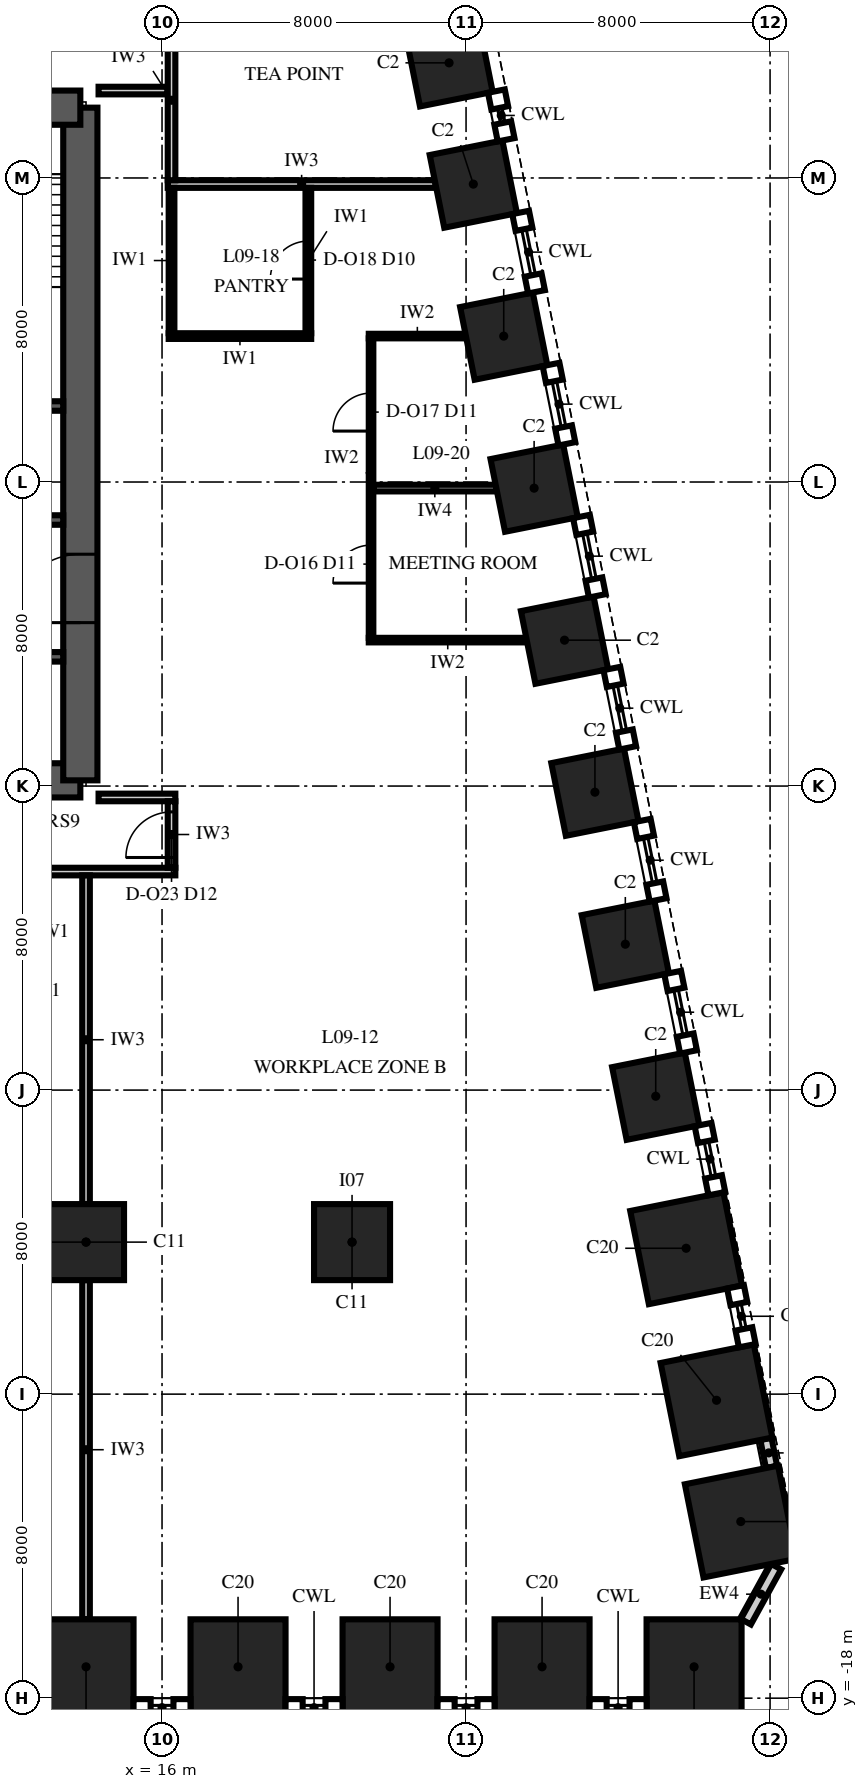
"""IFC4 building model, lengths in metres.
Left out: names, types, materials, properties, quantities, classifications, styles, units other than length and angle.
Written with IfcOpenShell. Run it as: python <this file> out.ifc"""

import sys

from ifc_helpers import new_model, si_unit, direction, frame, frame_2d, origin, origin_2d, place, context, subcontext, project, spatial, polyline, rectangle, outline, extrude, element, fill, save


model = new_model("IFC4")
c1 = context("Model", 3, precision=1e-05, world=origin(), true_north=direction((0.0, 1.0)))
c2 = subcontext(c1, "Body", "Model", "MODEL_VIEW")
j1 = project(units=[si_unit("LENGTHUNIT", "METRE"), si_unit("PLANEANGLEUNIT", "RADIAN")], contexts=[c1])
p1 = place(None, origin())
s1 = spatial("IfcSite", under=j1, at=p1, CompositionType="ELEMENT")
p2 = place(p1, origin())
s2 = spatial("IfcBuilding", under=s1, at=p2, CompositionType="ELEMENT")
p3 = place(p2, frame((0.0, 0.0, 48.0)))
s3 = spatial("IfcBuildingStorey", under=s2, at=p3, CompositionType="ELEMENT", Elevation=48.0)
for number, where, z_axis, x_axis in (
    (1, (14.0, -17.175, 0.0), (0.0, 0.0, 1.0), (1.0, 0.0, 0.0)),
    (2, (18.0, -17.175, 0.0), (0.0, 0.0, 1.0), (1.0, 0.0, 0.0)),
    (3, (22.0, -17.175, 0.0), (0.0, 0.0, 1.0), (1.0, 0.0, 0.0)),
    (4, (26.0, -17.175, 0.0), (0.0, 0.0, 1.0), (1.0, 0.0, 0.0)),
    (5, (30.0, -17.175, 0.0), (0.0, 0.0, 1.0), (1.0, 0.0, 0.0)),
    (6, (31.229, -13.353, 0.0), (0.0, 0.0, 1.0), (-0.196, 0.981, 0.0)),
    (7, (30.591, -10.162, 0.0), (0.0, 0.0, 1.0), (-0.196, 0.981, 0.0)),
    (8, (29.791, -6.162, 0.0), (0.0, 0.0, 1.0), (-0.196, 0.981, 0.0)),
):
    element("IfcColumn", number, at=place(p3, frame(where, z_axis=z_axis, x_axis=x_axis)), inside=s3, PredefinedType="COLUMN", context=c2, shape_type="SweptSolid", body=[
        extrude(rectangle(XDim=2.5, YDim=2.5, at=origin_2d()), origin(), (0.0, 0.0, 1.0), 4.0),
    ])
for number, where, z_axis, x_axis in (
    (9, (28.991, -2.162, 0.0), (0.0, 0.0, 1.0), (-0.196, 0.981, 0.0)),
    (10, (28.191, 1.838, 0.0), (0.0, 0.0, 1.0), (-0.196, 0.981, 0.0)),
    (11, (27.391, 5.838, 0.0), (0.0, 0.0, 1.0), (-0.196, 0.981, 0.0)),
    (12, (26.591, 9.838, 0.0), (0.0, 0.0, 1.0), (-0.196, 0.981, 0.0)),
    (13, (25.791, 13.838, 0.0), (0.0, 0.0, 1.0), (-0.196, 0.981, 0.0)),
    (14, (24.991, 17.838, 0.0), (0.0, 0.0, 1.0), (-0.196, 0.981, 0.0)),
    (15, (24.191, 21.838, 0.0), (0.0, 0.0, 1.0), (-0.196, 0.981, 0.0)),
    (16, (23.553, 25.029, 0.0), (0.0, 0.0, 1.0), (-0.196, 0.981, 0.0)),
):
    element("IfcColumn", number, at=place(p3, frame(where, z_axis=z_axis, x_axis=x_axis)), inside=s3, PredefinedType="COLUMN", context=c2, shape_type="SweptSolid", body=[
        extrude(rectangle(XDim=1.95, YDim=1.95, at=origin_2d()), origin(), (0.0, 0.0, 1.0), 4.0),
    ])
for number, where, z_axis, x_axis in (
    (17, (14.0, -6.0, 0.0), (0.0, 0.0, 1.0), (1.0, 0.0, 0.0)),
    (18, (21.0, -6.0, 0.0), (0.0, 0.0, 1.0), (1.0, 0.0, 0.0)),
):
    element("IfcColumn", number, at=place(p3, frame(where, z_axis=z_axis, x_axis=x_axis)), inside=s3, PredefinedType="COLUMN", context=c2, shape_type="SweptSolid", body=[
        extrude(rectangle(XDim=2.0, YDim=2.0, at=origin_2d()), origin(), (0.0, 0.0, 1.0), 4.0),
    ])
p4 = place(p3, frame((-13.85, 6.15, 0.0), z_axis=(0.0, 0.0, 1.0), x_axis=(1.0, 0.0, 0.0)))
e19 = element("IfcWall", 19, at=p4, inside=s3, PredefinedType="SHEAR", context=c2, shape_type="SweptSolid", body=[
    extrude(rectangle(XDim=27.7, YDim=0.9, at=frame_2d((13.85, 0.0))), origin(), (0.0, 0.0, 1.0), 4.0),
])
p5 = place(p3, frame((13.85, 6.15, 0.0), z_axis=(0.0, 0.0, 1.0), x_axis=(0.0, 1.0, 0.0)))
e20 = element("IfcWall", 20, at=p5, inside=s3, PredefinedType="SHEAR", context=c2, shape_type="SweptSolid", body=[
    extrude(outline(polyline([(0.0, -0.45), (17.7, -0.45), (17.7, 0.0), (17.25, 0.0), (17.25, 0.45), (0.45, 0.45), (0.45, 0.0), (0.0, 0.0), (0.0, -0.45)])), origin(), (0.0, 0.0, 1.0), 4.0),
])
p6 = place(p5, frame((4.15, 0.0, 0.0)))
e21 = element("IfcOpeningElement", 21, at=p6, cuts=e20, PredefinedType="OPENING", context=c2, shape_type="SweptSolid", body=[
    extrude(rectangle(XDim=1.8, YDim=2.4, at=frame_2d((0.9, 1.2))), frame((0.0, 0.465, 0.0), z_axis=(0.0, -1.0, 0.0), x_axis=(1.0, 0.0, 0.0)), (0.0, 0.0, 1.0), 0.93),
])
p7 = place(p3, frame((13.85, 23.85, 0.0), z_axis=(0.0, 0.0, 1.0), x_axis=(-1.0, 0.0, 0.0)))
e22 = element("IfcWall", 22, at=p7, inside=s3, PredefinedType="SHEAR", context=c2, shape_type="SweptSolid", body=[
    extrude(rectangle(XDim=27.7, YDim=0.9, at=frame_2d((13.85, 0.0))), origin(), (0.0, 0.0, 1.0), 4.0),
])
p8 = place(p7, frame((21.75, 0.0, 0.0)))
e23 = element("IfcOpeningElement", 23, at=p8, cuts=e22, PredefinedType="OPENING", context=c2, shape_type="SweptSolid", body=[
    extrude(rectangle(XDim=1.0, YDim=2.1, at=frame_2d((0.5, 1.05))), frame((0.0, 0.465, 0.0), z_axis=(0.0, -1.0, 0.0), x_axis=(1.0, 0.0, 0.0)), (0.0, 0.0, 1.0), 0.93),
])
p9 = place(p7, frame((4.95, 0.0, 0.0)))
e24 = element("IfcOpeningElement", 24, at=p9, cuts=e22, PredefinedType="OPENING", context=c2, shape_type="SweptSolid", body=[
    extrude(rectangle(XDim=1.0, YDim=2.1, at=frame_2d((0.5, 1.05))), frame((0.0, 0.465, 0.0), z_axis=(0.0, -1.0, 0.0), x_axis=(1.0, 0.0, 0.0)), (0.0, 0.0, 1.0), 0.93),
])
p10 = place(p7, frame((17.35, 0.0, 0.0)))
e25 = element("IfcOpeningElement", 25, at=p10, cuts=e22, PredefinedType="OPENING", context=c2, shape_type="SweptSolid", body=[
    extrude(rectangle(XDim=1.0, YDim=2.1, at=frame_2d((0.5, 1.05))), frame((0.0, 0.465, 0.0), z_axis=(0.0, -1.0, 0.0), x_axis=(1.0, 0.0, 0.0)), (0.0, 0.0, 1.0), 0.93),
])
p11 = place(p7, frame((13.35, 0.0, 0.0)))
e26 = element("IfcOpeningElement", 26, at=p11, cuts=e22, PredefinedType="OPENING", context=c2, shape_type="SweptSolid", body=[
    extrude(rectangle(XDim=1.0, YDim=2.1, at=frame_2d((0.5, 1.05))), frame((0.0, 0.465, 0.0), z_axis=(0.0, -1.0, 0.0), x_axis=(1.0, 0.0, 0.0)), (0.0, 0.0, 1.0), 0.93),
])
p12 = place(p7, frame((9.35, 0.0, 0.0)))
e27 = element("IfcOpeningElement", 27, at=p12, cuts=e22, PredefinedType="OPENING", context=c2, shape_type="SweptSolid", body=[
    extrude(rectangle(XDim=1.0, YDim=2.1, at=frame_2d((0.5, 1.05))), frame((0.0, 0.465, 0.0), z_axis=(0.0, -1.0, 0.0), x_axis=(1.0, 0.0, 0.0)), (0.0, 0.0, 1.0), 0.93),
])
p13 = place(p3, frame((-13.4, 9.4, 0.0), z_axis=(0.0, 0.0, 1.0), x_axis=(1.0, 0.0, 0.0)))
e28 = element("IfcWall", 28, at=p13, inside=s3, PredefinedType="SHEAR", context=c2, shape_type="SweptSolid", body=[
    extrude(rectangle(XDim=26.8, YDim=0.25, at=frame_2d((13.4, 0.0))), origin(), (0.0, 0.0, 1.0), 4.0),
])
p14 = place(p13, frame((0.25, 0.0, 0.0)))
e29 = element("IfcOpeningElement", 29, at=p14, cuts=e28, PredefinedType="OPENING", context=c2, shape_type="SweptSolid", body=[
    extrude(rectangle(XDim=1.1, YDim=2.1, at=frame_2d((0.55, 1.05))), frame((0.0, 0.14, 0.0), z_axis=(0.0, -1.0, 0.0), x_axis=(1.0, 0.0, 0.0)), (0.0, 0.0, 1.0), 0.28),
])
p15 = place(p13, frame((3.05, 0.0, 0.0)))
e30 = element("IfcOpeningElement", 30, at=p15, cuts=e28, PredefinedType="OPENING", context=c2, shape_type="SweptSolid", body=[
    extrude(rectangle(XDim=1.1, YDim=2.1, at=frame_2d((0.55, 1.05))), frame((0.0, 0.14, 0.0), z_axis=(0.0, -1.0, 0.0), x_axis=(1.0, 0.0, 0.0)), (0.0, 0.0, 1.0), 0.28),
])
p16 = place(p13, frame((5.85, 0.0, 0.0)))
e31 = element("IfcOpeningElement", 31, at=p16, cuts=e28, PredefinedType="OPENING", context=c2, shape_type="SweptSolid", body=[
    extrude(rectangle(XDim=1.1, YDim=2.1, at=frame_2d((0.55, 1.05))), frame((0.0, 0.14, 0.0), z_axis=(0.0, -1.0, 0.0), x_axis=(1.0, 0.0, 0.0)), (0.0, 0.0, 1.0), 0.28),
])
p17 = place(p3, frame((-13.4, 13.0, 0.0), z_axis=(0.0, 0.0, 1.0), x_axis=(1.0, 0.0, 0.0)))
e32 = element("IfcWall", 32, at=p17, inside=s3, PredefinedType="SHEAR", context=c2, shape_type="SweptSolid", body=[
    extrude(rectangle(XDim=26.8, YDim=0.25, at=frame_2d((13.4, 0.0))), origin(), (0.0, 0.0, 1.0), 4.0),
])
p18 = place(p17, frame((0.25, 0.0, 0.0)))
e33 = element("IfcOpeningElement", 33, at=p18, cuts=e32, PredefinedType="OPENING", context=c2, shape_type="SweptSolid", body=[
    extrude(rectangle(XDim=1.1, YDim=2.1, at=frame_2d((0.55, 1.05))), frame((0.0, 0.14, 0.0), z_axis=(0.0, -1.0, 0.0), x_axis=(1.0, 0.0, 0.0)), (0.0, 0.0, 1.0), 0.28),
])
p19 = place(p17, frame((8.65, 0.0, 0.0)))
e34 = element("IfcOpeningElement", 34, at=p19, cuts=e32, PredefinedType="OPENING", context=c2, shape_type="SweptSolid", body=[
    extrude(rectangle(XDim=1.1, YDim=2.1, at=frame_2d((0.55, 1.05))), frame((0.0, 0.14, 0.0), z_axis=(0.0, -1.0, 0.0), x_axis=(1.0, 0.0, 0.0)), (0.0, 0.0, 1.0), 0.28),
])
p20 = place(p17, frame((12.05, 0.0, 0.0)))
e35 = element("IfcOpeningElement", 35, at=p20, cuts=e32, PredefinedType="OPENING", context=c2, shape_type="SweptSolid", body=[
    extrude(rectangle(XDim=1.1, YDim=2.1, at=frame_2d((0.55, 1.05))), frame((0.0, 0.14, 0.0), z_axis=(0.0, -1.0, 0.0), x_axis=(1.0, 0.0, 0.0)), (0.0, 0.0, 1.0), 0.28),
])
p21 = place(p17, frame((15.25, 0.0, 0.0)))
e36 = element("IfcOpeningElement", 36, at=p21, cuts=e32, PredefinedType="OPENING", context=c2, shape_type="SweptSolid", body=[
    extrude(rectangle(XDim=0.9, YDim=2.1, at=frame_2d((0.45, 1.05))), frame((0.0, 0.14, 0.0), z_axis=(0.0, -1.0, 0.0), x_axis=(1.0, 0.0, 0.0)), (0.0, 0.0, 1.0), 0.28),
])
p22 = place(p17, frame((17.65, 0.0, 0.0)))
e37 = element("IfcOpeningElement", 37, at=p22, cuts=e32, PredefinedType="OPENING", context=c2, shape_type="SweptSolid", body=[
    extrude(rectangle(XDim=0.9, YDim=2.1, at=frame_2d((0.45, 1.05))), frame((0.0, 0.14, 0.0), z_axis=(0.0, -1.0, 0.0), x_axis=(1.0, 0.0, 0.0)), (0.0, 0.0, 1.0), 0.28),
])
p23 = place(p3, frame((-13.4, 16.0, 0.0), z_axis=(0.0, 0.0, 1.0), x_axis=(1.0, 0.0, 0.0)))
e38 = element("IfcWall", 38, at=p23, inside=s3, PredefinedType="SHEAR", context=c2, shape_type="SweptSolid", body=[
    extrude(rectangle(XDim=26.8, YDim=0.25, at=frame_2d((13.4, 0.0))), origin(), (0.0, 0.0, 1.0), 4.0),
])
p24 = place(p3, frame((31.363, -15.988, 0.0), z_axis=(0.0, 0.0, 1.0), x_axis=(0.481879089964, 0.876237720402, 0.0)))
e39 = element("IfcWall", 39, at=p24, inside=s3, PredefinedType="SOLIDWALL", context=c2, shape_type="SweptSolid", body=[
    extrude(rectangle(XDim=1.654, YDim=0.3, at=frame_2d((0.827, 0.0))), origin(), (0.0, 0.0, 1.0), 4.0),
])
p25 = place(p3, frame((32.038, -11.916, 0.0), z_axis=(0.0, 0.0, 1.0), x_axis=(-0.195867092459, 0.980630451338, 0.0)))
e40 = element("IfcWall", 40, at=p25, inside=s3, PredefinedType="SOLIDWALL", context=c2, shape_type="SweptSolid", body=[
    extrude(rectangle(XDim=0.754, YDim=0.3, at=frame_2d((0.377, 0.0))), origin(), (0.0, 0.0, 1.0), 4.0),
])
p26 = place(p3, frame((-16.35, 3.75, 0.0), z_axis=(0.0, 0.0, 1.0), x_axis=(1.0, 0.0, 0.0)))
e41 = element("IfcWall", 41, at=p26, inside=s3, PredefinedType="PARTITIONING", context=c2, shape_type="SweptSolid", body=[
    extrude(rectangle(XDim=32.7, YDim=0.2, at=frame_2d((16.35, 0.0))), origin(), (0.0, 0.0, 1.0), 3.25),
])
p27 = place(p26, frame((15.75, 0.0, 0.0)))
e42 = element("IfcOpeningElement", 42, at=p27, cuts=e41, PredefinedType="OPENING", context=c2, shape_type="SweptSolid", body=[
    extrude(rectangle(XDim=1.2, YDim=2.4, at=frame_2d((0.6, 1.2))), frame((0.0, 0.115, 0.0), z_axis=(0.0, -1.0, 0.0), x_axis=(1.0, 0.0, 0.0)), (0.0, 0.0, 1.0), 0.23),
])
p28 = place(p3, frame((14.33, 5.7, 0.0), z_axis=(0.0, 0.0, 1.0), x_axis=(1.0, 0.0, 0.0)))
e43 = element("IfcWall", 43, at=p28, inside=s3, PredefinedType="PARTITIONING", context=c2, shape_type="SweptSolid", body=[
    extrude(rectangle(XDim=2.02, YDim=0.2, at=frame_2d((1.01, 0.0))), origin(), (0.0, 0.0, 1.0), 3.85),
])
p29 = place(p3, frame((21.44, 9.84, 0.0), z_axis=(0.0, 0.0, 1.0), x_axis=(1.0, 0.0, 0.0)))
e44 = element("IfcWall", 44, at=p29, inside=s3, PredefinedType="PARTITIONING", context=c2, shape_type="SweptSolid", body=[
    extrude(rectangle(XDim=4.156, YDim=0.12, at=frame_2d((2.078, 0.0))), origin(), (0.0, 0.0, 1.0), 3.25),
])
p30 = place(p3, frame((21.56, 13.84, 0.0), z_axis=(0.0, 0.0, 1.0), x_axis=(1.0, 0.0, 0.0)))
e45 = element("IfcWall", 45, at=p30, inside=s3, PredefinedType="PARTITIONING", context=c2, shape_type="SweptSolid", body=[
    extrude(rectangle(XDim=3.236, YDim=0.175, at=frame_2d((1.618, 0.0))), origin(), (0.0, 0.0, 1.0), 3.25),
])
p31 = place(p3, frame((16.175, 17.84, 0.0), z_axis=(0.0, 0.0, 1.0), x_axis=(1.0, 0.0, 0.0)))
e46 = element("IfcWall", 46, at=p31, inside=s3, PredefinedType="PARTITIONING", context=c2, shape_type="SweptSolid", body=[
    extrude(rectangle(XDim=3.75, YDim=0.15, at=frame_2d((1.875, 0.0))), origin(), (0.0, 0.0, 1.0), 3.25),
])
p32 = place(p3, frame((21.44, 17.84, 0.0), z_axis=(0.0, 0.0, 1.0), x_axis=(1.0, 0.0, 0.0)))
e47 = element("IfcWall", 47, at=p32, inside=s3, PredefinedType="PARTITIONING", context=c2, shape_type="SweptSolid", body=[
    extrude(rectangle(XDim=2.556, YDim=0.12, at=frame_2d((1.278, 0.0))), origin(), (0.0, 0.0, 1.0), 3.25),
])
p33 = place(p3, frame((16.15, 21.84, 0.0), z_axis=(0.0, 0.0, 1.0), x_axis=(1.0, 0.0, 0.0)))
e48 = element("IfcWall", 48, at=p33, inside=s3, PredefinedType="PARTITIONING", context=c2, shape_type="SweptSolid", body=[
    extrude(rectangle(XDim=7.046, YDim=0.2, at=frame_2d((3.523, 0.0))), origin(), (0.0, 0.0, 1.0), 3.25),
])
p34 = place(p3, frame((14.33, 24.3, 0.0), z_axis=(0.0, 0.0, 1.0), x_axis=(1.0, 0.0, 0.0)))
e49 = element("IfcWall", 49, at=p34, inside=s3, PredefinedType="PARTITIONING", context=c2, shape_type="SweptSolid", body=[
    extrude(rectangle(XDim=1.82, YDim=0.2, at=frame_2d((0.91, 0.0))), origin(), (0.0, 0.0, 1.0), 3.4),
])
p35 = place(p3, frame((14.0, -15.925, 0.0), z_axis=(0.0, 0.0, 1.0), x_axis=(0.0, 1.0, 0.0)))
e50 = element("IfcWall", 50, at=p35, inside=s3, PredefinedType="PARTITIONING", context=c2, shape_type="SweptSolid", body=[
    extrude(rectangle(XDim=8.925, YDim=0.2, at=frame_2d((4.462, 0.0))), origin(), (0.0, 0.0, 1.0), 3.25),
])
p36 = place(p3, frame((14.0, -5.0, 0.0), z_axis=(0.0, 0.0, 1.0), x_axis=(0.0, 1.0, 0.0)))
e51 = element("IfcWall", 51, at=p36, inside=s3, PredefinedType="PARTITIONING", context=c2, shape_type="SweptSolid", body=[
    extrude(rectangle(XDim=8.65, YDim=0.2, at=frame_2d((4.325, 0.0))), origin(), (0.0, 0.0, 1.0), 3.25),
])
p37 = place(p3, frame((16.25, 3.85, 0.0), z_axis=(0.0, 0.0, 1.0), x_axis=(0.0, 1.0, 0.0)))
e52 = element("IfcWall", 52, at=p37, inside=s3, PredefinedType="PARTITIONING", context=c2, shape_type="SweptSolid", body=[
    extrude(rectangle(XDim=1.75, YDim=0.2, at=frame_2d((0.875, 0.0))), origin(), (0.0, 0.0, 1.0), 3.85),
])
p38 = place(p37, frame((0.27, 0.0, 0.0)))
e53 = element("IfcOpeningElement", 53, at=p38, cuts=e52, PredefinedType="OPENING", context=c2, shape_type="SweptSolid", body=[
    extrude(rectangle(XDim=1.2, YDim=2.4, at=frame_2d((0.6, 1.2))), frame((0.0, 0.115, 0.0), z_axis=(0.0, -1.0, 0.0), x_axis=(1.0, 0.0, 0.0)), (0.0, 0.0, 1.0), 0.23),
])
p39 = place(p3, frame((16.25, 17.915, 0.0), z_axis=(0.0, 0.0, 1.0), x_axis=(0.0, 1.0, 0.0)))
e54 = element("IfcWall", 54, at=p39, inside=s3, PredefinedType="PARTITIONING", context=c2, shape_type="SweptSolid", body=[
    extrude(rectangle(XDim=3.825, YDim=0.15, at=frame_2d((1.913, 0.0))), origin(), (0.0, 0.0, 1.0), 3.25),
])
p40 = place(p3, frame((16.25, 21.94, 0.0), z_axis=(0.0, 0.0, 1.0), x_axis=(0.0, 1.0, 0.0)))
e55 = element("IfcWall", 55, at=p40, inside=s3, PredefinedType="PARTITIONING", context=c2, shape_type="SweptSolid", body=[
    extrude(rectangle(XDim=4.21, YDim=0.2, at=frame_2d((2.105, 0.0))), origin(), (0.0, 0.0, 1.0), 3.4),
])
p41 = place(p3, frame((19.85, 17.915, 0.0), z_axis=(0.0, 0.0, 1.0), x_axis=(0.0, 1.0, 0.0)))
e56 = element("IfcWall", 56, at=p41, inside=s3, PredefinedType="PARTITIONING", context=c2, shape_type="SweptSolid", body=[
    extrude(rectangle(XDim=3.825, YDim=0.15, at=frame_2d((1.913, 0.0))), origin(), (0.0, 0.0, 1.0), 3.25),
])
p42 = place(p41, frame((1.425, 0.0, 0.0)))
e57 = element("IfcOpeningElement", 57, at=p42, cuts=e56, PredefinedType="OPENING", context=c2, shape_type="SweptSolid", body=[
    extrude(rectangle(XDim=1.0, YDim=2.3, at=frame_2d((0.5, 1.15))), frame((0.0, 0.09, 0.0), z_axis=(0.0, -1.0, 0.0), x_axis=(1.0, 0.0, 0.0)), (0.0, 0.0, 1.0), 0.18),
])
p43 = place(p3, frame((21.5, 9.9, 0.0), z_axis=(0.0, 0.0, 1.0), x_axis=(0.0, 1.0, 0.0)))
e58 = element("IfcWall", 58, at=p43, inside=s3, PredefinedType="PARTITIONING", context=c2, shape_type="SweptSolid", body=[
    extrude(rectangle(XDim=7.88, YDim=0.12, at=frame_2d((3.94, 0.0))), origin(), (0.0, 0.0, 1.0), 3.25),
])
p44 = place(p43, frame((1.44, 0.0, 0.0)))
e59 = element("IfcOpeningElement", 59, at=p44, cuts=e58, PredefinedType="OPENING", context=c2, shape_type="SweptSolid", body=[
    extrude(rectangle(XDim=1.0, YDim=2.4, at=frame_2d((0.5, 1.2))), frame((0.0, 0.075, 0.0), z_axis=(0.0, -1.0, 0.0), x_axis=(1.0, 0.0, 0.0)), (0.0, 0.0, 1.0), 0.15),
])
p45 = place(p43, frame((5.44, 0.0, 0.0)))
e60 = element("IfcOpeningElement", 60, at=p45, cuts=e58, PredefinedType="OPENING", context=c2, shape_type="SweptSolid", body=[
    extrude(rectangle(XDim=1.0, YDim=2.4, at=frame_2d((0.5, 1.2))), frame((0.0, 0.075, 0.0), z_axis=(0.0, -1.0, 0.0), x_axis=(1.0, 0.0, 0.0)), (0.0, 0.0, 1.0), 0.15),
])
p46 = place(p6, origin())
e61 = element("IfcDoor", 61, at=p46, inside=s3, OperationType="DOUBLE_DOOR_SINGLE_SWING", PredefinedType="DOOR", context=c2, shape_type="SweptSolid", body=[
    extrude(rectangle(XDim=1.8, YDim=2.4, at=frame_2d((0.9, 1.2))), frame((0.0, 0.45, 0.0), z_axis=(0.0, -1.0, 0.0), x_axis=(1.0, 0.0, 0.0)), (0.0, 0.0, 1.0), 0.899),
])
fill(e21, e61)
p47 = place(p44, origin())
e62 = element("IfcDoor", 62, at=p47, inside=s3, OperationType="SINGLE_SWING_RIGHT", PredefinedType="DOOR", context=c2, shape_type="SweptSolid", body=[
    extrude(rectangle(XDim=1.0, YDim=2.4, at=frame_2d((0.5, 1.2))), frame((0.0, 0.06, 0.0), z_axis=(0.0, -1.0, 0.0), x_axis=(1.0, 0.0, 0.0)), (0.0, 0.0, 1.0), 0.12),
])
fill(e59, e62)
p48 = place(p45, origin())
e63 = element("IfcDoor", 63, at=p48, inside=s3, OperationType="SINGLE_SWING_RIGHT", PredefinedType="DOOR", context=c2, shape_type="SweptSolid", body=[
    extrude(rectangle(XDim=1.0, YDim=2.4, at=frame_2d((0.5, 1.2))), frame((0.0, 0.06, 0.0), z_axis=(0.0, -1.0, 0.0), x_axis=(1.0, 0.0, 0.0)), (0.0, 0.0, 1.0), 0.12),
])
fill(e60, e63)
p49 = place(p42, origin())
e64 = element("IfcDoor", 64, at=p49, inside=s3, OperationType="SINGLE_SWING_LEFT", PredefinedType="DOOR", context=c2, shape_type="SweptSolid", body=[
    extrude(rectangle(XDim=1.0, YDim=2.3, at=frame_2d((0.5, 1.15))), frame((0.0, 0.075, 0.0), z_axis=(0.0, -1.0, 0.0), x_axis=(1.0, 0.0, 0.0)), (0.0, 0.0, 1.0), 0.149),
])
fill(e57, e64)
p50 = place(p38, origin())
e65 = element("IfcDoor", 65, at=p50, inside=s3, OperationType="SINGLE_SWING_LEFT", PredefinedType="DOOR", context=c2, shape_type="SweptSolid", body=[
    extrude(rectangle(XDim=1.2, YDim=2.4, at=frame_2d((0.6, 1.2))), frame((0.0, 0.1, 0.0), z_axis=(0.0, -1.0, 0.0), x_axis=(1.0, 0.0, 0.0)), (0.0, 0.0, 1.0), 0.199),
])
fill(e53, e65)
save(model, sys.argv[1])
